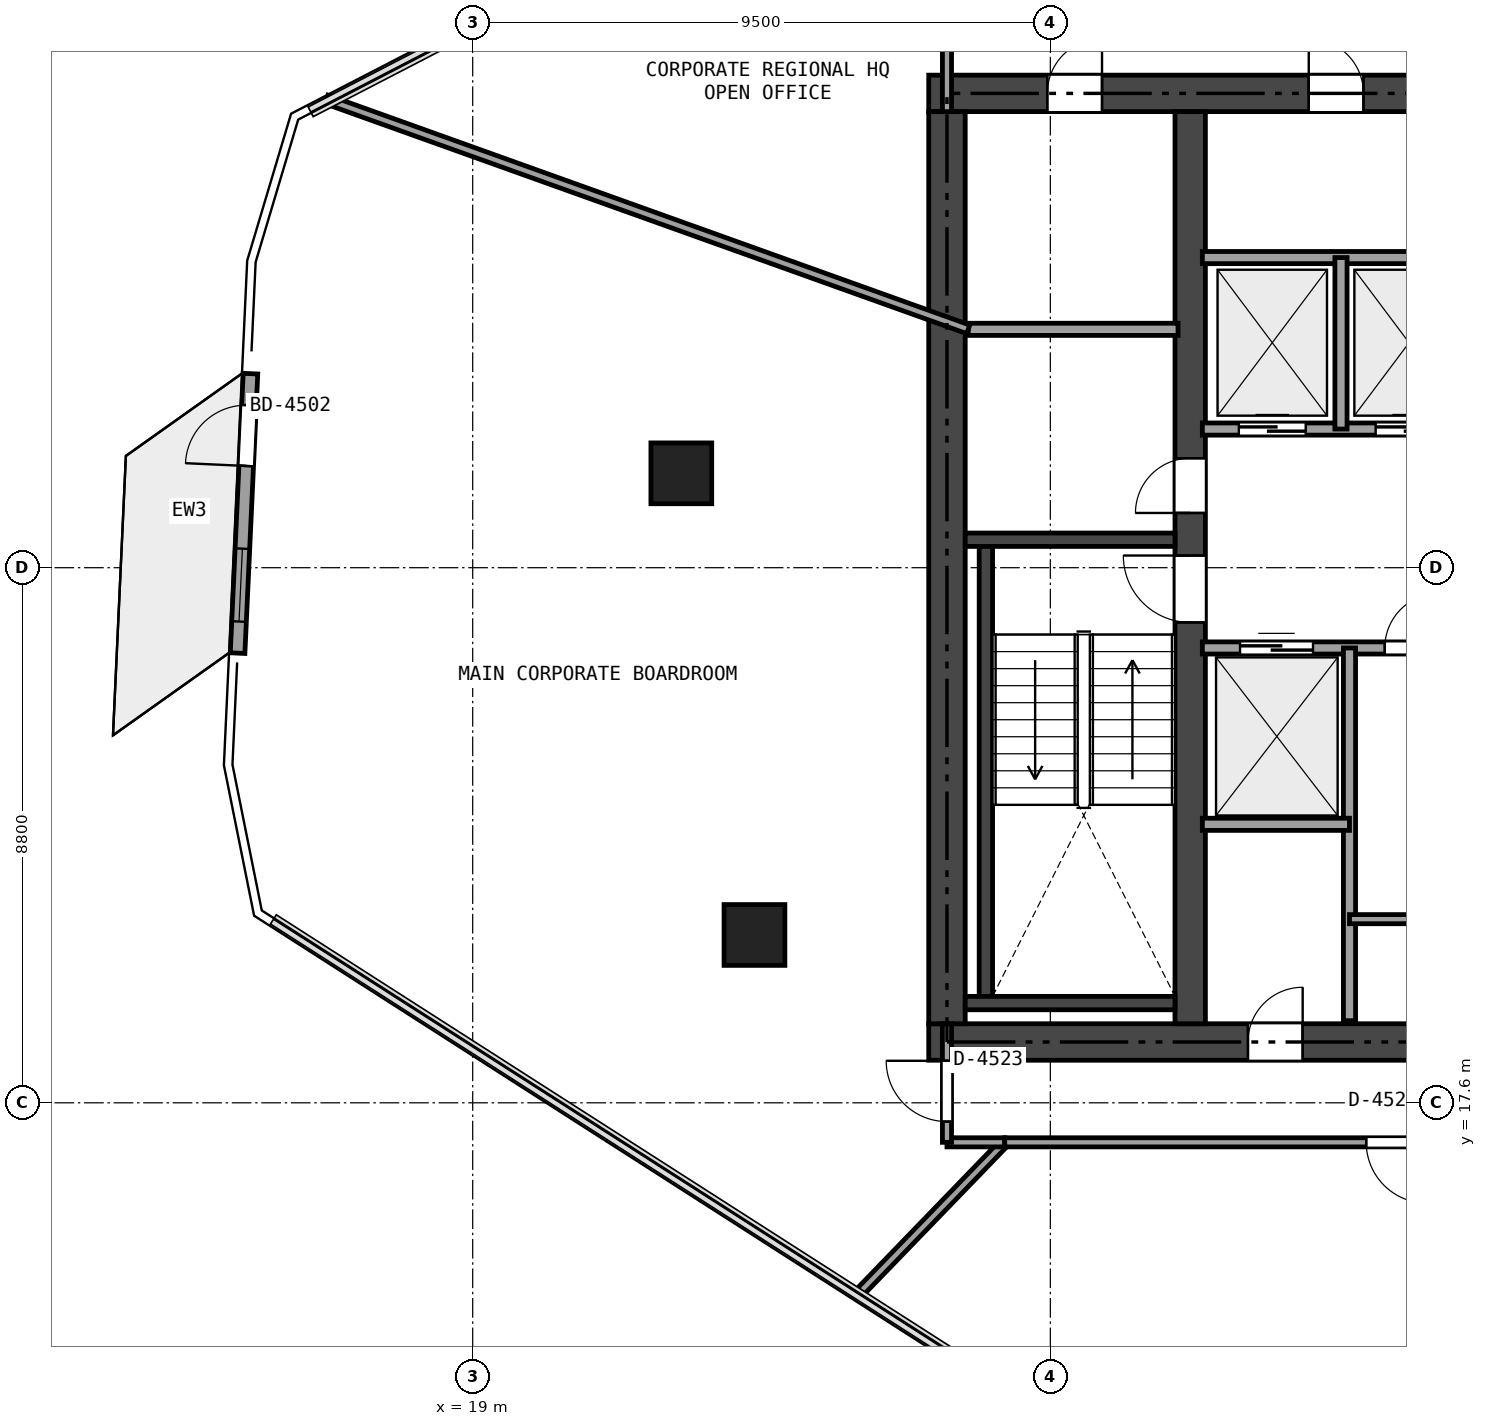
"""IFC4 building model, lengths in metres.
Left out: names, types, materials, properties, quantities, classifications, styles, units other than length and angle.
Written with IfcOpenShell. Run it as: python <this file> out.ifc"""

import sys

from ifc_helpers import new_model, si_unit, direction, frame, frame_2d, origin, origin_2d, place, context, subcontext, project, spatial, rectangle, extrude, element, fill, save


model = new_model("IFC4")
c1 = context("Model", 3, precision=1e-05, world=origin(), true_north=direction((0.0, 1.0)))
c2 = subcontext(c1, "Body", "Model", "MODEL_VIEW")
j1 = project(units=[si_unit("LENGTHUNIT", "METRE"), si_unit("PLANEANGLEUNIT", "RADIAN")], contexts=[c1])
p1 = place(None, origin())
s1 = spatial("IfcSite", under=j1, at=p1, CompositionType="ELEMENT")
p2 = place(p1, origin())
s2 = spatial("IfcBuilding", under=s1, at=p2, CompositionType="ELEMENT")
p3 = place(p2, frame((0.0, 0.0, 168.9)))
s3 = spatial("IfcBuildingStorey", under=s2, at=p3, CompositionType="ELEMENT", Elevation=168.9)
p4 = place(p3, frame((26.5, 18.6, 0.0), z_axis=(0.0, 0.0, 1.0), x_axis=(1.0, 0.0, 0.0)))
e1 = element("IfcWall", 1, at=p4, inside=s3, PredefinedType="SHEAR", context=c2, shape_type="SweptSolid", body=[
    extrude(rectangle(XDim=21.4, YDim=0.6, at=frame_2d((10.7, 0.0))), origin(), (0.0, 0.0, 1.0), 3.24),
])
p5 = place(p4, frame((12.425, 0.0, 0.0)))
e2 = element("IfcOpeningElement", 2, at=p5, cuts=e1, PredefinedType="OPENING", context=c2, shape_type="SweptSolid", body=[
    extrude(rectangle(XDim=1.15, YDim=2.15, at=frame_2d((0.575, 1.075))), frame((0.0, 0.31, 0.0), z_axis=(0.0, -1.0, 0.0), x_axis=(1.0, 0.0, 0.0)), (0.0, 0.0, 1.0), 0.62),
])
p6 = place(p4, frame((5.25, 0.0, 0.0)))
e3 = element("IfcOpeningElement", 3, at=p6, cuts=e1, PredefinedType="OPENING", context=c2, shape_type="SweptSolid", body=[
    extrude(rectangle(XDim=0.9, YDim=2.1, at=frame_2d((0.45, 1.05))), frame((0.0, 0.31, 0.0), z_axis=(0.0, -1.0, 0.0), x_axis=(1.0, 0.0, 0.0)), (0.0, 0.0, 1.0), 0.62),
])
p7 = place(p3, frame((26.5, 34.2, 0.0), z_axis=(0.0, 0.0, 1.0), x_axis=(1.0, 0.0, 0.0)))
e4 = element("IfcWall", 4, at=p7, inside=s3, PredefinedType="SHEAR", context=c2, shape_type="SweptSolid", body=[
    extrude(rectangle(XDim=21.4, YDim=0.6, at=frame_2d((10.7, 0.0))), origin(), (0.0, 0.0, 1.0), 3.24),
])
p8 = place(p7, frame((9.7, 0.0, 0.0)))
e5 = element("IfcOpeningElement", 5, at=p8, cuts=e4, PredefinedType="OPENING", context=c2, shape_type="SweptSolid", body=[
    extrude(rectangle(XDim=1.1, YDim=2.15, at=frame_2d((0.55, 1.075))), frame((0.0, 0.31, 0.0), z_axis=(0.0, -1.0, 0.0), x_axis=(1.0, 0.0, 0.0)), (0.0, 0.0, 1.0), 0.62),
])
p9 = place(p7, frame((1.95, 0.0, 0.0)))
e6 = element("IfcOpeningElement", 6, at=p9, cuts=e4, PredefinedType="OPENING", context=c2, shape_type="SweptSolid", body=[
    extrude(rectangle(XDim=0.9, YDim=2.1, at=frame_2d((0.45, 1.05))), frame((0.0, 0.31, 0.0), z_axis=(0.0, -1.0, 0.0), x_axis=(1.0, 0.0, 0.0)), (0.0, 0.0, 1.0), 0.62),
])
p10 = place(p7, frame((6.25, 0.0, 0.0)))
e7 = element("IfcOpeningElement", 7, at=p10, cuts=e4, PredefinedType="OPENING", context=c2, shape_type="SweptSolid", body=[
    extrude(rectangle(XDim=0.9, YDim=2.1, at=frame_2d((0.45, 1.05))), frame((0.0, 0.31, 0.0), z_axis=(0.0, -1.0, 0.0), x_axis=(1.0, 0.0, 0.0)), (0.0, 0.0, 1.0), 0.62),
])
p11 = place(p3, frame((26.8, 18.9, 0.0), z_axis=(0.0, 0.0, 1.0), x_axis=(0.0, 1.0, 0.0)))
e8 = element("IfcWall", 8, at=p11, inside=s3, PredefinedType="SHEAR", context=c2, shape_type="SweptSolid", body=[
    extrude(rectangle(XDim=15.0, YDim=0.6, at=frame_2d((7.5, 0.0))), origin(), (0.0, 0.0, 1.0), 3.24),
])
p12 = place(p3, frame((30.8, 18.9, 0.0), z_axis=(0.0, 0.0, 1.0), x_axis=(0.0, 1.0, 0.0)))
e9 = element("IfcWall", 9, at=p12, inside=s3, PredefinedType="SHEAR", context=c2, shape_type="SweptSolid", body=[
    extrude(rectangle(XDim=15.0, YDim=0.5, at=frame_2d((7.5, 0.0))), origin(), (0.0, 0.0, 1.0), 3.24),
])
p13 = place(p12, frame((6.6, 0.0, 0.0)))
e10 = element("IfcOpeningElement", 10, at=p13, cuts=e9, PredefinedType="OPENING", context=c2, shape_type="SweptSolid", body=[
    extrude(rectangle(XDim=1.1, YDim=2.15, at=frame_2d((0.55, 1.075))), frame((0.0, 0.26, 0.0), z_axis=(0.0, -1.0, 0.0), x_axis=(1.0, 0.0, 0.0)), (0.0, 0.0, 1.0), 0.52),
])
p14 = place(p12, frame((8.4, 0.0, 0.0)))
e11 = element("IfcOpeningElement", 11, at=p14, cuts=e9, PredefinedType="OPENING", context=c2, shape_type="SweptSolid", body=[
    extrude(rectangle(XDim=0.9, YDim=2.1, at=frame_2d((0.45, 1.05))), frame((0.0, 0.26, 0.0), z_axis=(0.0, -1.0, 0.0), x_axis=(1.0, 0.0, 0.0)), (0.0, 0.0, 1.0), 0.52),
])
p15 = place(p3, frame((27.1, 26.86, 0.0), z_axis=(0.0, 0.0, 1.0), x_axis=(1.0, 0.0, 0.0)))
e12 = element("IfcWall", 12, at=p15, inside=s3, PredefinedType="SHEAR", context=c2, shape_type="SweptSolid", body=[
    extrude(rectangle(XDim=3.45, YDim=0.22, at=frame_2d((1.725, 0.0))), origin(), (0.0, 0.0, 1.0), 3.24),
])
p16 = place(p3, frame((27.44, 19.35, 0.0), z_axis=(0.0, 0.0, 1.0), x_axis=(0.0, 1.0, 0.0)))
e13 = element("IfcWall", 13, at=p16, inside=s3, PredefinedType="SHEAR", context=c2, shape_type="SweptSolid", body=[
    extrude(rectangle(XDim=7.4, YDim=0.22, at=frame_2d((3.7, 0.0))), origin(), (0.0, 0.0, 1.0), 3.24),
])
p17 = place(p3, frame((27.1, 19.24, 0.0), z_axis=(0.0, 0.0, 1.0), x_axis=(1.0, 0.0, 0.0)))
e14 = element("IfcWall", 14, at=p17, inside=s3, PredefinedType="SHEAR", context=c2, shape_type="SweptSolid", body=[
    extrude(rectangle(XDim=3.45, YDim=0.22, at=frame_2d((1.725, 0.0))), origin(), (0.0, 0.0, 1.0), 3.24),
])
for number, where, z_axis, x_axis in (
    (15, (22.431, 27.952, 0.0), (0.0, 0.0, 1.0), (1.0, 0.0, 0.0)),
    (16, (23.634, 20.36, 0.0), (0.0, 0.0, 1.0), (1.0, 0.0, 0.0)),
):
    element("IfcColumn", number, at=place(p3, frame(where, z_axis=z_axis, x_axis=x_axis)), inside=s3, PredefinedType="COLUMN", context=c2, shape_type="SweptSolid", body=[
        extrude(rectangle(XDim=1.0, YDim=1.0, at=origin_2d()), origin(), (0.0, 0.0, 1.0), 3.24),
    ])
p18 = place(p3, frame((15.133, 24.995, 0.0), z_axis=(0.0, 0.0, 1.0), x_axis=(0.046059961298, 0.998938676779, 0.0)))
e17 = element("IfcWall", 17, at=p18, inside=s3, PredefinedType="SOLIDWALL", context=c2, shape_type="SweptSolid", body=[
    extrude(rectangle(XDim=4.601, YDim=0.24, at=frame_2d((2.3, 0.0))), origin(), (0.0, 0.0, 1.0), 3.24),
])
p19 = place(p18, frame((3.081, 0.0, 0.0)))
e18 = element("IfcOpeningElement", 18, at=p19, cuts=e17, PredefinedType="OPENING", context=c2, shape_type="SweptSolid", body=[
    extrude(rectangle(XDim=1.0, YDim=2.15, at=frame_2d((0.5, 1.075))), frame((0.0, 0.13, 0.0), z_axis=(0.0, -1.0, 0.0), x_axis=(1.0, 0.0, 0.0)), (0.0, 0.0, 1.0), 0.26),
])
p20 = place(p18, frame((0.52, 0.0, 0.2)))
e19 = element("IfcOpeningElement", 19, at=p20, cuts=e17, PredefinedType="OPENING", context=c2, shape_type="SweptSolid", body=[
    extrude(rectangle(XDim=1.2, YDim=1.8, at=frame_2d((0.6, 0.9))), frame((0.0, 0.13, 0.0), z_axis=(0.0, -1.0, 0.0), x_axis=(1.0, 0.0, 0.0)), (0.0, 0.0, 1.0), 0.26),
])
p21 = place(p3, frame((27.15, 30.32, 0.0), z_axis=(0.0, 0.0, 1.0), x_axis=(1.0, 0.0, 0.0)))
e20 = element("IfcWall", 20, at=p21, inside=s3, PredefinedType="SOLIDWALL", context=c2, shape_type="SweptSolid", body=[
    extrude(rectangle(XDim=3.45, YDim=0.2, at=frame_2d((1.725, 0.0))), origin(), (0.0, 0.0, 1.0), 3.24),
])
p22 = place(p3, frame((31.0, 28.68, 0.0), z_axis=(0.0, 0.0, 1.0), x_axis=(1.0, 0.0, 0.0)))
e21 = element("IfcWall", 21, at=p22, inside=s3, PredefinedType="SOLIDWALL", context=c2, shape_type="SweptSolid", body=[
    extrude(rectangle(XDim=4.42, YDim=0.2, at=frame_2d((2.21, 0.0))), origin(), (0.0, 0.0, 1.0), 3.24),
])
p23 = place(p22, frame((0.6, 0.0, 0.0)))
e22 = element("IfcOpeningElement", 22, at=p23, cuts=e21, PredefinedType="OPENING", context=c2, shape_type="SweptSolid", body=[
    extrude(rectangle(XDim=1.1, YDim=2.15, at=frame_2d((0.55, 1.075))), frame((0.0, 0.11, 0.0), z_axis=(0.0, -1.0, 0.0), x_axis=(1.0, 0.0, 0.0)), (0.0, 0.0, 1.0), 0.22),
])
p24 = place(p22, frame((2.85, 0.0, 0.0)))
e23 = element("IfcOpeningElement", 23, at=p24, cuts=e21, PredefinedType="OPENING", context=c2, shape_type="SweptSolid", body=[
    extrude(rectangle(XDim=1.1, YDim=2.15, at=frame_2d((0.55, 1.075))), frame((0.0, 0.11, 0.0), z_axis=(0.0, -1.0, 0.0), x_axis=(1.0, 0.0, 0.0)), (0.0, 0.0, 1.0), 0.22),
])
p25 = place(p3, frame((31.0, 31.5, 0.0), z_axis=(0.0, 0.0, 1.0), x_axis=(1.0, 0.0, 0.0)))
e24 = element("IfcWall", 24, at=p25, inside=s3, PredefinedType="SOLIDWALL", context=c2, shape_type="SweptSolid", body=[
    extrude(rectangle(XDim=4.42, YDim=0.2, at=frame_2d((2.21, 0.0))), origin(), (0.0, 0.0, 1.0), 3.24),
])
p26 = place(p3, frame((33.28, 28.68, 0.0), z_axis=(0.0, 0.0, 1.0), x_axis=(0.0, 1.0, 0.0)))
e25 = element("IfcWall", 25, at=p26, inside=s3, PredefinedType="SOLIDWALL", context=c2, shape_type="SweptSolid", body=[
    extrude(rectangle(XDim=2.82, YDim=0.2, at=frame_2d((1.41, 0.0))), origin(), (0.0, 0.0, 1.0), 3.24),
])
p27 = place(p3, frame((31.0, 25.08, 0.0), z_axis=(0.0, 0.0, 1.0), x_axis=(1.0, 0.0, 0.0)))
e26 = element("IfcWall", 26, at=p27, inside=s3, PredefinedType="SOLIDWALL", context=c2, shape_type="SweptSolid", body=[
    extrude(rectangle(XDim=4.42, YDim=0.2, at=frame_2d((2.21, 0.0))), origin(), (0.0, 0.0, 1.0), 3.24),
])
p28 = place(p27, frame((3.0, 0.0, 0.0)))
e27 = element("IfcOpeningElement", 27, at=p28, cuts=e26, PredefinedType="OPENING", context=c2, shape_type="SweptSolid", body=[
    extrude(rectangle(XDim=0.9, YDim=2.1, at=frame_2d((0.45, 1.05))), frame((0.0, 0.11, 0.0), z_axis=(0.0, -1.0, 0.0), x_axis=(1.0, 0.0, 0.0)), (0.0, 0.0, 1.0), 0.22),
])
p29 = place(p27, frame((0.62, 0.0, 0.0)))
e28 = element("IfcOpeningElement", 28, at=p29, cuts=e26, PredefinedType="OPENING", context=c2, shape_type="SweptSolid", body=[
    extrude(rectangle(XDim=1.2, YDim=2.15, at=frame_2d((0.6, 1.075))), frame((0.0, 0.11, 0.0), z_axis=(0.0, -1.0, 0.0), x_axis=(1.0, 0.0, 0.0)), (0.0, 0.0, 1.0), 0.22),
])
p30 = place(p3, frame((33.42, 18.95, 0.0), z_axis=(0.0, 0.0, 1.0), x_axis=(0.0, 1.0, 0.0)))
e29 = element("IfcWall", 29, at=p30, inside=s3, PredefinedType="SOLIDWALL", context=c2, shape_type="SweptSolid", body=[
    extrude(rectangle(XDim=6.13, YDim=0.2, at=frame_2d((3.065, 0.0))), origin(), (0.0, 0.0, 1.0), 2.761),
])
p31 = place(p3, frame((31.0, 22.18, 0.0), z_axis=(0.0, 0.0, 1.0), x_axis=(1.0, 0.0, 0.0)))
e30 = element("IfcWall", 30, at=p31, inside=s3, PredefinedType="SOLIDWALL", context=c2, shape_type="SweptSolid", body=[
    extrude(rectangle(XDim=2.42, YDim=0.2, at=frame_2d((1.21, 0.0))), origin(), (0.0, 0.0, 1.0), 3.24),
])
p32 = place(p3, frame((33.42, 20.62, 0.0), z_axis=(0.0, 0.0, 1.0), x_axis=(1.0, 0.0, 0.0)))
e31 = element("IfcWall", 31, at=p32, inside=s3, PredefinedType="PARTITIONING", context=c2, shape_type="SweptSolid", body=[
    extrude(rectangle(XDim=2.0, YDim=0.15, at=frame_2d((1.0, 0.0))), origin(), (0.0, 0.0, 1.0), 3.24),
])
p33 = place(p3, frame((16.595, 34.101, 0.0), z_axis=(0.0, 0.0, 1.0), x_axis=(0.941419775025, -0.337237019309, 0.0)))
e32 = element("IfcWall", 32, at=p33, inside=s3, PredefinedType="PARTITIONING", context=c2, shape_type="SweptSolid", body=[
    extrude(rectangle(XDim=11.212, YDim=0.15, at=frame_2d((5.606, 0.0))), origin(), (0.0, 0.0, 1.0), 2.725),
])
p34 = place(p3, frame((26.8, 33.9, 0.0), z_axis=(0.0, 0.0, 1.0), x_axis=(0.0, 1.0, 0.0)))
e33 = element("IfcWall", 33, at=p34, inside=s3, PredefinedType="PARTITIONING", context=c2, shape_type="SweptSolid", body=[
    extrude(rectangle(XDim=1.95, YDim=0.15, at=frame_2d((0.975, 0.0))), origin(), (0.0, 0.0, 1.0), 2.725),
])
p35 = place(p3, frame((25.31, 14.426, 0.0), z_axis=(0.0, 0.0, 1.0), x_axis=(0.695043667408, 0.718967523881, 0.0)))
e34 = element("IfcWall", 34, at=p35, inside=s3, PredefinedType="PARTITIONING", context=c2, shape_type="SweptSolid", body=[
    extrude(rectangle(XDim=3.51, YDim=0.15, at=frame_2d((1.755, 0.0))), origin(), (0.0, 0.0, 1.0), 2.725),
])
p36 = place(p3, frame((27.75, 16.95, 0.0), z_axis=(0.0, 0.0, 1.0), x_axis=(-1.0, 0.0, 0.0)))
e35 = element("IfcWall", 35, at=p36, inside=s3, PredefinedType="PARTITIONING", context=c2, shape_type="SweptSolid", body=[
    extrude(rectangle(XDim=0.95, YDim=0.15, at=frame_2d((0.475, 0.0))), origin(), (0.0, 0.0, 1.0), 2.725),
])
p37 = place(p3, frame((26.8, 16.95, 0.0), z_axis=(0.0, 0.0, 1.0), x_axis=(0.0, 1.0, 0.0)))
e36 = element("IfcWall", 36, at=p37, inside=s3, PredefinedType="PARTITIONING", context=c2, shape_type="SweptSolid", body=[
    extrude(rectangle(XDim=1.95, YDim=0.15, at=frame_2d((0.975, 0.0))), origin(), (0.0, 0.0, 1.0), 2.725),
])
p38 = place(p37, frame((0.341, 0.0, 0.0)))
e37 = element("IfcOpeningElement", 37, at=p38, cuts=e36, PredefinedType="OPENING", context=c2, shape_type="SweptSolid", body=[
    extrude(rectangle(XDim=1.0, YDim=2.15, at=frame_2d((0.5, 1.075))), frame((0.0, 0.085, 0.0), z_axis=(0.0, -1.0, 0.0), x_axis=(1.0, 0.0, 0.0)), (0.0, 0.0, 1.0), 0.17),
])
p39 = place(p3, frame((40.64, 16.95, 0.0), z_axis=(0.0, 0.0, 1.0), x_axis=(-1.0, 0.0, 0.0)))
e38 = element("IfcWall", 38, at=p39, inside=s3, PredefinedType="PARTITIONING", context=c2, shape_type="SweptSolid", body=[
    extrude(rectangle(XDim=12.89, YDim=0.15, at=frame_2d((6.445, 0.0))), origin(), (0.0, 0.0, 1.0), 2.607),
])
p40 = place(p39, frame((5.945, 0.0, 0.0)))
e39 = element("IfcOpeningElement", 39, at=p40, cuts=e38, PredefinedType="OPENING", context=c2, shape_type="SweptSolid", body=[
    extrude(rectangle(XDim=1.0, YDim=2.15, at=frame_2d((0.5, 1.075))), frame((0.0, 0.085, 0.0), z_axis=(0.0, -1.0, 0.0), x_axis=(1.0, 0.0, 0.0)), (0.0, 0.0, 1.0), 0.17),
])
p41 = place(p19, origin())
e40 = element("IfcDoor", 40, at=p41, inside=s3, OperationType="SINGLE_SWING_LEFT", PredefinedType="DOOR", context=c2, shape_type="SweptSolid", body=[
    extrude(rectangle(XDim=1.0, YDim=2.15, at=frame_2d((0.5, 1.075))), frame((0.0, 0.025, 0.0), z_axis=(0.0, -1.0, 0.0), x_axis=(1.0, 0.0, 0.0)), (0.0, 0.0, 1.0), 0.05),
])
fill(e18, e40)
p42 = place(p20, origin())
e41 = element("IfcWindow", 41, at=p42, inside=s3, PartitioningType="SINGLE_PANEL", PredefinedType="WINDOW", context=c2, shape_type="SweptSolid", body=[
    extrude(rectangle(XDim=1.2, YDim=1.8, at=frame_2d((0.6, 0.9))), frame((0.0, 0.03, 0.0), z_axis=(0.0, -1.0, 0.0), x_axis=(1.0, 0.0, 0.0)), (0.0, 0.0, 1.0), 0.06),
])
fill(e19, e41)
p43 = place(p13, origin())
e42 = element("IfcDoor", 42, at=p43, inside=s3, OperationType="SINGLE_SWING_RIGHT", PredefinedType="DOOR", context=c2, shape_type="SweptSolid", body=[
    extrude(rectangle(XDim=1.1, YDim=2.15, at=frame_2d((0.55, 1.075))), frame((0.0, 0.025, 0.0), z_axis=(0.0, -1.0, 0.0), x_axis=(1.0, 0.0, 0.0)), (0.0, 0.0, 1.0), 0.05),
])
fill(e10, e42)
p44 = place(p14, origin())
e43 = element("IfcDoor", 43, at=p44, inside=s3, OperationType="SINGLE_SWING_LEFT", PredefinedType="DOOR", context=c2, shape_type="SweptSolid", body=[
    extrude(rectangle(XDim=0.9, YDim=2.1, at=frame_2d((0.45, 1.05))), frame((0.0, 0.025, 0.0), z_axis=(0.0, -1.0, 0.0), x_axis=(1.0, 0.0, 0.0)), (0.0, 0.0, 1.0), 0.05),
])
fill(e11, e43)
p45 = place(p9, origin())
e44 = element("IfcDoor", 44, at=p45, inside=s3, OperationType="SINGLE_SWING_RIGHT", PredefinedType="DOOR", context=c2, shape_type="SweptSolid", body=[
    extrude(rectangle(XDim=0.9, YDim=2.1, at=frame_2d((0.45, 1.05))), frame((0.0, 0.025, 0.0), z_axis=(0.0, -1.0, 0.0), x_axis=(1.0, 0.0, 0.0)), (0.0, 0.0, 1.0), 0.05),
])
fill(e6, e44)
p46 = place(p10, origin())
e45 = element("IfcDoor", 45, at=p46, inside=s3, OperationType="SINGLE_SWING_LEFT", PredefinedType="DOOR", context=c2, shape_type="SweptSolid", body=[
    extrude(rectangle(XDim=0.9, YDim=2.1, at=frame_2d((0.45, 1.05))), frame((0.0, 0.025, 0.0), z_axis=(0.0, -1.0, 0.0), x_axis=(1.0, 0.0, 0.0)), (0.0, 0.0, 1.0), 0.05),
])
fill(e7, e45)
p47 = place(p6, origin())
e46 = element("IfcDoor", 46, at=p47, inside=s3, OperationType="SINGLE_SWING_RIGHT", PredefinedType="DOOR", context=c2, shape_type="SweptSolid", body=[
    extrude(rectangle(XDim=0.9, YDim=2.1, at=frame_2d((0.45, 1.05))), frame((0.0, 0.025, 0.0), z_axis=(0.0, -1.0, 0.0), x_axis=(1.0, 0.0, 0.0)), (0.0, 0.0, 1.0), 0.05),
])
fill(e3, e46)
p48 = place(p28, origin())
e47 = element("IfcDoor", 47, at=p48, inside=s3, OperationType="SINGLE_SWING_RIGHT", PredefinedType="DOOR", context=c2, shape_type="SweptSolid", body=[
    extrude(rectangle(XDim=0.9, YDim=2.1, at=frame_2d((0.45, 1.05))), frame((0.0, 0.025, 0.0), z_axis=(0.0, -1.0, 0.0), x_axis=(1.0, 0.0, 0.0)), (0.0, 0.0, 1.0), 0.05),
])
fill(e27, e47)
p49 = place(p23, origin())
e48 = element("IfcDoor", 48, at=p49, inside=s3, OperationType="SLIDING_TO_LEFT", PredefinedType="DOOR", context=c2, shape_type="SweptSolid", body=[
    extrude(rectangle(XDim=1.1, YDim=2.15, at=frame_2d((0.55, 1.075))), frame((0.0, 0.025, 0.0), z_axis=(0.0, -1.0, 0.0), x_axis=(1.0, 0.0, 0.0)), (0.0, 0.0, 1.0), 0.05),
])
fill(e22, e48)
p50 = place(p24, origin())
e49 = element("IfcDoor", 49, at=p50, inside=s3, OperationType="SLIDING_TO_LEFT", PredefinedType="DOOR", context=c2, shape_type="SweptSolid", body=[
    extrude(rectangle(XDim=1.1, YDim=2.15, at=frame_2d((0.55, 1.075))), frame((0.0, 0.025, 0.0), z_axis=(0.0, -1.0, 0.0), x_axis=(1.0, 0.0, 0.0)), (0.0, 0.0, 1.0), 0.05),
])
fill(e23, e49)
p51 = place(p29, origin())
e50 = element("IfcDoor", 50, at=p51, inside=s3, OperationType="SLIDING_TO_LEFT", PredefinedType="DOOR", context=c2, shape_type="SweptSolid", body=[
    extrude(rectangle(XDim=1.2, YDim=2.15, at=frame_2d((0.6, 1.075))), frame((0.0, 0.025, 0.0), z_axis=(0.0, -1.0, 0.0), x_axis=(1.0, 0.0, 0.0)), (0.0, 0.0, 1.0), 0.05),
])
fill(e28, e50)
p52 = place(p38, origin())
e51 = element("IfcDoor", 51, at=p52, inside=s3, OperationType="SINGLE_SWING_RIGHT", PredefinedType="DOOR", context=c2, shape_type="SweptSolid", body=[
    extrude(rectangle(XDim=1.0, YDim=2.15, at=frame_2d((0.5, 1.075))), frame((0.0, 0.025, 0.0), z_axis=(0.0, -1.0, 0.0), x_axis=(1.0, 0.0, 0.0)), (0.0, 0.0, 1.0), 0.05),
])
fill(e37, e51)
p53 = place(p40, origin())
e52 = element("IfcDoor", 52, at=p53, inside=s3, OperationType="SINGLE_SWING_LEFT", PredefinedType="DOOR", context=c2, shape_type="SweptSolid", body=[
    extrude(rectangle(XDim=1.0, YDim=2.15, at=frame_2d((0.5, 1.075))), frame((0.0, 0.025, 0.0), z_axis=(0.0, -1.0, 0.0), x_axis=(1.0, 0.0, 0.0)), (0.0, 0.0, 1.0), 0.05),
])
fill(e39, e52)
save(model, sys.argv[1])
